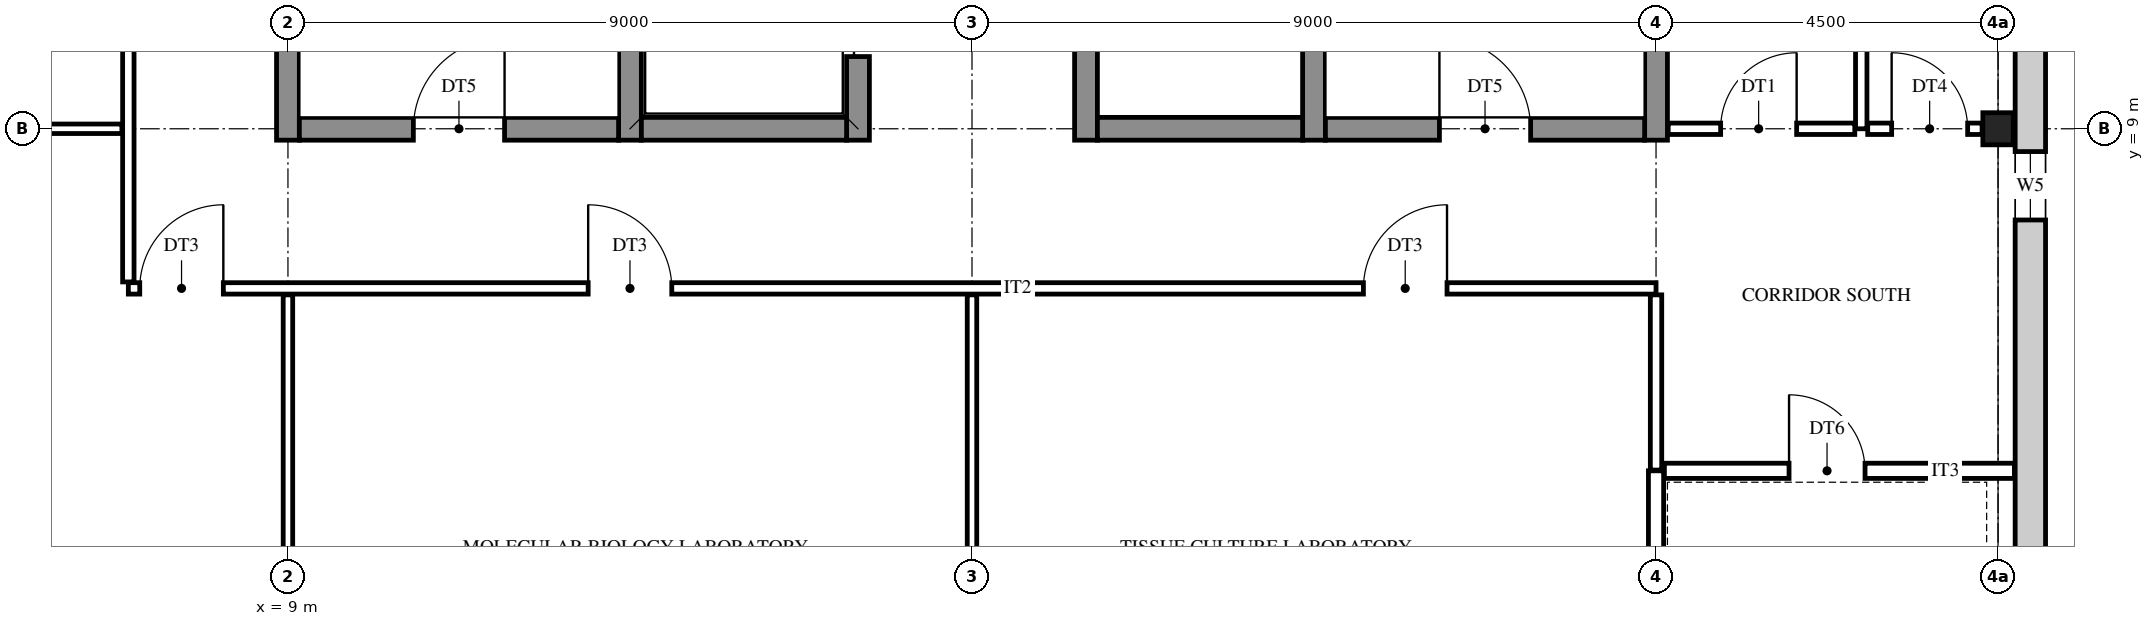
"""IFC4 building model, lengths in metres.
Left out: names, types, materials, properties, quantities, classifications, styles, units other than length and angle.
Written with IfcOpenShell. Run it as: python <this file> out.ifc"""

import sys

from ifc_helpers import new_model, si_unit, direction, frame, frame_2d, origin, origin_2d, place, context, subcontext, project, spatial, rectangle, i_section, extrude, element, fill, save


model = new_model("IFC4")
c1 = context("Model", 3, precision=1e-05, world=origin(), true_north=direction((0.0, 1.0)))
c2 = subcontext(c1, "Body", "Model", "MODEL_VIEW")
j1 = project(units=[si_unit("LENGTHUNIT", "METRE"), si_unit("PLANEANGLEUNIT", "RADIAN")], contexts=[c1])
p1 = place(None, origin())
s1 = spatial("IfcSite", under=j1, at=p1, CompositionType="ELEMENT")
p2 = place(p1, origin())
s2 = spatial("IfcBuilding", under=s1, at=p2, CompositionType="ELEMENT")
p3 = place(p2, frame((0.0, 0.0, 15.0)))
s3 = spatial("IfcBuildingStorey", under=s2, at=p3, CompositionType="ELEMENT", Elevation=15.0)
p4 = place(p3, frame((31.5, 9.0, 0.0), z_axis=(0.0, 0.0, 1.0), x_axis=(1.0, 0.0, 0.0)))
e1 = element("IfcColumn", 1, at=p4, inside=s3, PredefinedType="COLUMN", context=c2, shape_type="SweptSolid", body=[
    extrude(i_section(OverallWidth=0.4, OverallDepth=0.422, WebThickness=0.028, FlangeThickness=0.036, at=origin_2d()), origin(), (0.0, 0.0, 1.0), 4.2),
])
for number, where, z_axis, x_axis in (
    (2, (9.0, 8.85, 0.0), (0.0, 0.0, 1.0), (0.0, 1.0, 0.0)),
    (3, (13.5, 8.85, 0.0), (0.0, 0.0, 1.0), (0.0, 1.0, 0.0)),
):
    element("IfcWall", number, at=place(p3, frame(where, z_axis=z_axis, x_axis=x_axis)), inside=s3, PredefinedType="SHEAR", context=c2, shape_type="SweptSolid", body=[
        extrude(rectangle(XDim=9.3, YDim=0.3, at=frame_2d((4.65, 0.0))), origin(), (0.0, 0.0, 1.0), 4.2),
    ])
p5 = place(p3, frame((16.5, 8.85, 0.0), z_axis=(0.0, 0.0, 1.0), x_axis=(0.0, 1.0, 0.0)))
e4 = element("IfcWall", 4, at=p5, inside=s3, PredefinedType="SHEAR", context=c2, shape_type="SweptSolid", body=[
    extrude(rectangle(XDim=9.3, YDim=0.3, at=frame_2d((4.65, 0.0))), origin(), (0.0, 0.0, 1.0), 4.2),
])
p6 = place(p5, frame((1.1, 0.0, 0.0)))
e5 = element("IfcOpeningElement", 5, at=p6, cuts=e4, PredefinedType="OPENING", context=c2, shape_type="SweptSolid", body=[
    extrude(rectangle(XDim=1.1, YDim=2.1, at=frame_2d((0.55, 1.05))), frame((0.0, 0.16, 0.0), z_axis=(0.0, -1.0, 0.0), x_axis=(1.0, 0.0, 0.0)), (0.0, 0.0, 1.0), 0.32),
])
p7 = place(p5, frame((4.1, 0.0, 0.0)))
e6 = element("IfcOpeningElement", 6, at=p7, cuts=e4, PredefinedType="OPENING", context=c2, shape_type="SweptSolid", body=[
    extrude(rectangle(XDim=1.1, YDim=2.1, at=frame_2d((0.55, 1.05))), frame((0.0, 0.16, 0.0), z_axis=(0.0, -1.0, 0.0), x_axis=(1.0, 0.0, 0.0)), (0.0, 0.0, 1.0), 0.32),
])
p8 = place(p3, frame((19.5, 8.85, 0.0), z_axis=(0.0, 0.0, 1.0), x_axis=(0.0, 1.0, 0.0)))
e7 = element("IfcWall", 7, at=p8, inside=s3, PredefinedType="SHEAR", context=c2, shape_type="SweptSolid", body=[
    extrude(rectangle(XDim=9.3, YDim=0.3, at=frame_2d((4.65, 0.0))), origin(), (0.0, 0.0, 1.0), 4.2),
])
p9 = place(p8, frame((3.95, 0.0, 0.0)))
e8 = element("IfcOpeningElement", 8, at=p9, cuts=e7, PredefinedType="OPENING", context=c2, shape_type="SweptSolid", body=[
    extrude(rectangle(XDim=1.4, YDim=2.1, at=frame_2d((0.7, 1.05))), frame((0.0, 0.16, 0.0), z_axis=(0.0, -1.0, 0.0), x_axis=(1.0, 0.0, 0.0)), (0.0, 0.0, 1.0), 0.32),
])
p10 = place(p8, frame((7.1, 0.0, 0.0)))
e9 = element("IfcOpeningElement", 9, at=p10, cuts=e7, PredefinedType="OPENING", context=c2, shape_type="SweptSolid", body=[
    extrude(rectangle(XDim=1.1, YDim=2.1, at=frame_2d((0.55, 1.05))), frame((0.0, 0.16, 0.0), z_axis=(0.0, -1.0, 0.0), x_axis=(1.0, 0.0, 0.0)), (0.0, 0.0, 1.0), 0.32),
])
for number, where, z_axis, x_axis in (
    (10, (22.5, 8.85, 0.0), (0.0, 0.0, 1.0), (0.0, 1.0, 0.0)),
    (11, (27.0, 8.85, 0.0), (0.0, 0.0, 1.0), (0.0, 1.0, 0.0)),
):
    element("IfcWall", number, at=place(p3, frame(where, z_axis=z_axis, x_axis=x_axis)), inside=s3, PredefinedType="SHEAR", context=c2, shape_type="SweptSolid", body=[
        extrude(rectangle(XDim=9.3, YDim=0.3, at=frame_2d((4.65, 0.0))), origin(), (0.0, 0.0, 1.0), 4.2),
    ])
p11 = place(p3, frame((9.15, 9.0, 0.0), z_axis=(0.0, 0.0, 1.0), x_axis=(1.0, 0.0, 0.0)))
e12 = element("IfcWall", 12, at=p11, inside=s3, PredefinedType="SHEAR", context=c2, shape_type="SweptSolid", body=[
    extrude(rectangle(XDim=4.2, YDim=0.3, at=frame_2d((2.1, 0.0))), origin(), (0.0, 0.0, 1.0), 4.2),
])
p12 = place(p11, frame((1.5, 0.0, 0.0)))
e13 = element("IfcOpeningElement", 13, at=p12, cuts=e12, PredefinedType="OPENING", context=c2, shape_type="SweptSolid", body=[
    extrude(rectangle(XDim=1.2, YDim=2.1, at=frame_2d((0.6, 1.05))), frame((0.0, 0.16, 0.0), z_axis=(0.0, -1.0, 0.0), x_axis=(1.0, 0.0, 0.0)), (0.0, 0.0, 1.0), 0.32),
])
for number, where, z_axis, x_axis in (
    (14, (13.65, 9.0, 0.0), (0.0, 0.0, 1.0), (1.0, 0.0, 0.0)),
    (15, (19.65, 9.0, 0.0), (0.0, 0.0, 1.0), (1.0, 0.0, 0.0)),
):
    element("IfcWall", number, at=place(p3, frame(where, z_axis=z_axis, x_axis=x_axis)), inside=s3, PredefinedType="SHEAR", context=c2, shape_type="SweptSolid", body=[
        extrude(rectangle(XDim=2.7, YDim=0.3, at=frame_2d((1.35, 0.0))), origin(), (0.0, 0.0, 1.0), 4.2),
    ])
p13 = place(p3, frame((22.65, 9.0, 0.0), z_axis=(0.0, 0.0, 1.0), x_axis=(1.0, 0.0, 0.0)))
e16 = element("IfcWall", 16, at=p13, inside=s3, PredefinedType="SHEAR", context=c2, shape_type="SweptSolid", body=[
    extrude(rectangle(XDim=4.2, YDim=0.3, at=frame_2d((2.1, 0.0))), origin(), (0.0, 0.0, 1.0), 4.2),
])
p14 = place(p13, frame((1.5, 0.0, 0.0)))
e17 = element("IfcOpeningElement", 17, at=p14, cuts=e16, PredefinedType="OPENING", context=c2, shape_type="SweptSolid", body=[
    extrude(rectangle(XDim=1.2, YDim=2.1, at=frame_2d((0.6, 1.05))), frame((0.0, 0.16, 0.0), z_axis=(0.0, -1.0, 0.0), x_axis=(1.0, 0.0, 0.0)), (0.0, 0.0, 1.0), 0.32),
])
p15 = place(p3, frame((31.925, 27.225, 0.0), z_axis=(0.0, 0.0, 1.0), x_axis=(0.0, -1.0, 0.0)))
e18 = element("IfcWall", 18, at=p15, inside=s3, PredefinedType="STANDARD", context=c2, shape_type="SweptSolid", body=[
    extrude(rectangle(XDim=27.45, YDim=0.4, at=frame_2d((13.725, 0.0))), origin(), (0.0, 0.0, 1.0), 4.2),
])
p16 = place(p15, frame((26.025, 0.0, 0.9)))
e19 = element("IfcOpeningElement", 19, at=p16, cuts=e18, PredefinedType="OPENING", context=c2, shape_type="SweptSolid", body=[
    extrude(rectangle(XDim=0.9, YDim=2.0, at=frame_2d((0.45, 1.0))), frame((0.0, 0.21, 0.0), z_axis=(0.0, -1.0, 0.0), x_axis=(1.0, 0.0, 0.0)), (0.0, 0.0, 1.0), 0.42),
])
p17 = place(p15, frame((18.525, 0.0, 0.9)))
e20 = element("IfcOpeningElement", 20, at=p17, cuts=e18, PredefinedType="OPENING", context=c2, shape_type="SweptSolid", body=[
    extrude(rectangle(XDim=0.9, YDim=2.0, at=frame_2d((0.45, 1.0))), frame((0.0, 0.21, 0.0), z_axis=(0.0, -1.0, 0.0), x_axis=(1.0, 0.0, 0.0)), (0.0, 0.0, 1.0), 0.42),
])
p18 = place(p15, frame((15.675, 0.0, 1.6)))
e21 = element("IfcOpeningElement", 21, at=p18, cuts=e18, PredefinedType="OPENING", context=c2, shape_type="SweptSolid", body=[
    extrude(rectangle(XDim=0.6, YDim=0.9, at=frame_2d((0.3, 0.45))), frame((0.0, 0.21, 0.0), z_axis=(0.0, -1.0, 0.0), x_axis=(1.0, 0.0, 0.0)), (0.0, 0.0, 1.0), 0.42),
])
p19 = place(p15, frame((11.175, 0.0, 1.6)))
e22 = element("IfcOpeningElement", 22, at=p19, cuts=e18, PredefinedType="OPENING", context=c2, shape_type="SweptSolid", body=[
    extrude(rectangle(XDim=0.6, YDim=0.9, at=frame_2d((0.3, 0.45))), frame((0.0, 0.21, 0.0), z_axis=(0.0, -1.0, 0.0), x_axis=(1.0, 0.0, 0.0)), (0.0, 0.0, 1.0), 0.42),
])
p20 = place(p15, frame((8.025, 0.0, 0.9)))
e23 = element("IfcOpeningElement", 23, at=p20, cuts=e18, PredefinedType="OPENING", context=c2, shape_type="SweptSolid", body=[
    extrude(rectangle(XDim=0.9, YDim=2.0, at=frame_2d((0.45, 1.0))), frame((0.0, 0.21, 0.0), z_axis=(0.0, -1.0, 0.0), x_axis=(1.0, 0.0, 0.0)), (0.0, 0.0, 1.0), 0.42),
])
p21 = place(p15, frame((0.525, 0.0, 0.9)))
e24 = element("IfcOpeningElement", 24, at=p21, cuts=e18, PredefinedType="OPENING", context=c2, shape_type="SweptSolid", body=[
    extrude(rectangle(XDim=0.9, YDim=2.0, at=frame_2d((0.45, 1.0))), frame((0.0, 0.21, 0.0), z_axis=(0.0, -1.0, 0.0), x_axis=(1.0, 0.0, 0.0)), (0.0, 0.0, 1.0), 0.42),
])
p22 = place(p3, frame((6.9, 6.985, 0.0), z_axis=(0.0, 0.0, 1.0), x_axis=(0.0, 1.0, 0.0)))
e25 = element("IfcWall", 25, at=p22, inside=s3, PredefinedType="PARTITIONING", context=c2, shape_type="SweptSolid", body=[
    extrude(rectangle(XDim=13.03, YDim=0.15, at=frame_2d((6.515, 0.0))), origin(), (0.0, 0.0, 1.0), 3.537),
])
p23 = place(p22, frame((3.765, 0.0, 0.0)))
e26 = element("IfcOpeningElement", 26, at=p23, cuts=e25, PredefinedType="OPENING", context=c2, shape_type="SweptSolid", body=[
    extrude(rectangle(XDim=1.0, YDim=2.1, at=frame_2d((0.5, 1.05))), frame((0.0, 0.085, 0.0), z_axis=(0.0, -1.0, 0.0), x_axis=(1.0, 0.0, 0.0)), (0.0, 0.0, 1.0), 0.17),
])
p24 = place(p22, frame((8.265, 0.0, 0.0)))
e27 = element("IfcOpeningElement", 27, at=p24, cuts=e25, PredefinedType="OPENING", context=c2, shape_type="SweptSolid", body=[
    extrude(rectangle(XDim=1.0, YDim=2.1, at=frame_2d((0.5, 1.05))), frame((0.0, 0.085, 0.0), z_axis=(0.0, -1.0, 0.0), x_axis=(1.0, 0.0, 0.0)), (0.0, 0.0, 1.0), 0.17),
])
for number, where, z_axis, x_axis in (
    (28, (9.0, 0.221, 0.0), (0.0, 0.0, 1.0), (0.0, 1.0, 0.0)),
    (29, (18.0, 0.221, 0.0), (0.0, 0.0, 1.0), (0.0, 1.0, 0.0)),
):
    element("IfcWall", number, at=place(p3, frame(where, z_axis=z_axis, x_axis=x_axis)), inside=s3, PredefinedType="PARTITIONING", context=c2, shape_type="SweptSolid", body=[
        extrude(rectangle(XDim=6.594, YDim=0.125, at=frame_2d((3.297, 0.0))), origin(), (0.0, 0.0, 1.0), 3.537),
    ])
p25 = place(p3, frame((27.0, 0.221, 0.0), z_axis=(0.0, 0.0, 1.0), x_axis=(0.0, 1.0, 0.0)))
e30 = element("IfcWall", 30, at=p25, inside=s3, PredefinedType="PARTITIONING", context=c2, shape_type="SweptSolid", body=[
    extrude(rectangle(XDim=4.279, YDim=0.2, at=frame_2d((2.14, 0.0))), origin(), (0.0, 0.0, 1.0), 3.537),
])
p26 = place(p3, frame((27.0, 4.51, 0.0), z_axis=(0.0, 0.0, 1.0), x_axis=(0.0, 1.0, 0.0)))
e31 = element("IfcWall", 31, at=p26, inside=s3, PredefinedType="PARTITIONING", context=c2, shape_type="SweptSolid", body=[
    extrude(rectangle(XDim=2.305, YDim=0.15, at=frame_2d((1.152, 0.0))), origin(), (0.0, 0.0, 1.0), 3.537),
])
p27 = place(p3, frame((29.7, 9.0, 0.0), z_axis=(0.0, 0.0, 1.0), x_axis=(0.0, 1.0, 0.0)))
e32 = element("IfcWall", 32, at=p27, inside=s3, PredefinedType="PARTITIONING", context=c2, shape_type="SweptSolid", body=[
    extrude(rectangle(XDim=6.3, YDim=0.15, at=frame_2d((3.15, 0.0))), origin(), (0.0, 0.0, 1.0), 3.537),
])
p28 = place(p27, frame((4.0, 0.0, 0.0)))
e33 = element("IfcOpeningElement", 33, at=p28, cuts=e32, PredefinedType="OPENING", context=c2, shape_type="SweptSolid", body=[
    extrude(rectangle(XDim=1.0, YDim=2.1, at=frame_2d((0.5, 1.05))), frame((0.0, 0.085, 0.0), z_axis=(0.0, -1.0, 0.0), x_axis=(1.0, 0.0, 0.0)), (0.0, 0.0, 1.0), 0.17),
])
p29 = place(p3, frame((27.11, 4.5, 0.0), z_axis=(0.0, 0.0, 1.0), x_axis=(1.0, 0.0, 0.0)))
e34 = element("IfcWall", 34, at=p29, inside=s3, PredefinedType="PARTITIONING", context=c2, shape_type="SweptSolid", body=[
    extrude(rectangle(XDim=4.605, YDim=0.2, at=frame_2d((2.302, 0.0))), origin(), (0.0, 0.0, 1.0), 3.537),
])
p30 = place(p29, frame((1.64, 0.0, 0.0)))
e35 = element("IfcOpeningElement", 35, at=p30, cuts=e34, PredefinedType="OPENING", context=c2, shape_type="SweptSolid", body=[
    extrude(rectangle(XDim=1.0, YDim=2.1, at=frame_2d((0.5, 1.05))), frame((0.0, 0.11, 0.0), z_axis=(0.0, -1.0, 0.0), x_axis=(1.0, 0.0, 0.0)), (0.0, 0.0, 1.0), 0.22),
])
p31 = place(p3, frame((6.9, 6.9, 0.0), z_axis=(0.0, 0.0, 1.0), x_axis=(1.0, 0.0, 0.0)))
e36 = element("IfcWall", 36, at=p31, inside=s3, PredefinedType="PARTITIONING", context=c2, shape_type="SweptSolid", body=[
    extrude(rectangle(XDim=20.1, YDim=0.15, at=frame_2d((10.05, 0.0))), origin(), (0.0, 0.0, 1.0), 3.537),
])
p32 = place(p31, frame((0.15, 0.0, 0.0)))
e37 = element("IfcOpeningElement", 37, at=p32, cuts=e36, PredefinedType="OPENING", context=c2, shape_type="SweptSolid", body=[
    extrude(rectangle(XDim=1.1, YDim=2.1, at=frame_2d((0.55, 1.05))), frame((0.0, 0.085, 0.0), z_axis=(0.0, -1.0, 0.0), x_axis=(1.0, 0.0, 0.0)), (0.0, 0.0, 1.0), 0.17),
])
p33 = place(p31, frame((6.05, 0.0, 0.0)))
e38 = element("IfcOpeningElement", 38, at=p33, cuts=e36, PredefinedType="OPENING", context=c2, shape_type="SweptSolid", body=[
    extrude(rectangle(XDim=1.1, YDim=2.1, at=frame_2d((0.55, 1.05))), frame((0.0, 0.085, 0.0), z_axis=(0.0, -1.0, 0.0), x_axis=(1.0, 0.0, 0.0)), (0.0, 0.0, 1.0), 0.17),
])
p34 = place(p31, frame((16.25, 0.0, 0.0)))
e39 = element("IfcOpeningElement", 39, at=p34, cuts=e36, PredefinedType="OPENING", context=c2, shape_type="SweptSolid", body=[
    extrude(rectangle(XDim=1.1, YDim=2.1, at=frame_2d((0.55, 1.05))), frame((0.0, 0.085, 0.0), z_axis=(0.0, -1.0, 0.0), x_axis=(1.0, 0.0, 0.0)), (0.0, 0.0, 1.0), 0.17),
])
p35 = place(p3, frame((0.21, 9.0, 0.0), z_axis=(0.0, 0.0, 1.0), x_axis=(1.0, 0.0, 0.0)))
e40 = element("IfcWall", 40, at=p35, inside=s3, PredefinedType="PARTITIONING", context=c2, shape_type="SweptSolid", body=[
    extrude(rectangle(XDim=6.605, YDim=0.125, at=frame_2d((3.302, 0.0))), origin(), (0.0, 0.0, 1.0), 3.537),
])
p36 = place(p3, frame((27.16, 9.0, 0.0), z_axis=(0.0, 0.0, 1.0), x_axis=(1.0, 0.0, 0.0)))
e41 = element("IfcWall", 41, at=p36, inside=s3, PredefinedType="PARTITIONING", context=c2, shape_type="SweptSolid", body=[
    extrude(rectangle(XDim=2.455, YDim=0.15, at=frame_2d((1.228, 0.0))), origin(), (0.0, 0.0, 1.0), 3.537),
])
p37 = place(p36, frame((0.69, 0.0, 0.0)))
e42 = element("IfcOpeningElement", 42, at=p37, cuts=e41, PredefinedType="OPENING", context=c2, shape_type="SweptSolid", body=[
    extrude(rectangle(XDim=1.0, YDim=2.1, at=frame_2d((0.5, 1.05))), frame((0.0, 0.085, 0.0), z_axis=(0.0, -1.0, 0.0), x_axis=(1.0, 0.0, 0.0)), (0.0, 0.0, 1.0), 0.17),
])
p38 = place(p3, frame((29.785, 9.0, 0.0), z_axis=(0.0, 0.0, 1.0), x_axis=(1.0, 0.0, 0.0)))
e43 = element("IfcWall", 43, at=p38, inside=s3, PredefinedType="PARTITIONING", context=c2, shape_type="SweptSolid", body=[
    extrude(rectangle(XDim=1.505, YDim=0.15, at=frame_2d((0.752, 0.0))), origin(), (0.0, 0.0, 1.0), 3.537),
])
p39 = place(p38, frame((0.315, 0.0, 0.0)))
e44 = element("IfcOpeningElement", 44, at=p39, cuts=e43, PredefinedType="OPENING", context=c2, shape_type="SweptSolid", body=[
    extrude(rectangle(XDim=1.0, YDim=2.1, at=frame_2d((0.5, 1.05))), frame((0.0, 0.085, 0.0), z_axis=(0.0, -1.0, 0.0), x_axis=(1.0, 0.0, 0.0)), (0.0, 0.0, 1.0), 0.17),
])
p40 = place(p17, origin())
e45 = element("IfcWindow", 45, at=p40, inside=s3, PartitioningType="SINGLE_PANEL", PredefinedType="WINDOW", context=c2, shape_type="SweptSolid", body=[
    extrude(rectangle(XDim=0.9, YDim=2.0, at=frame_2d((0.45, 1.0))), frame((0.0, 0.03, 0.0), z_axis=(0.0, -1.0, 0.0), x_axis=(1.0, 0.0, 0.0)), (0.0, 0.0, 1.0), 0.06),
])
fill(e20, e45)
p41 = place(p12, origin())
e46 = element("IfcDoor", 46, at=p41, inside=s3, OperationType="SINGLE_SWING_RIGHT", PredefinedType="DOOR", context=c2, shape_type="SweptSolid", body=[
    extrude(rectangle(XDim=1.2, YDim=2.1, at=frame_2d((0.6, 1.05))), frame((0.0, 0.025, 0.0), z_axis=(0.0, -1.0, 0.0), x_axis=(1.0, 0.0, 0.0)), (0.0, 0.0, 1.0), 0.05),
])
fill(e13, e46)
p42 = place(p14, origin())
e47 = element("IfcDoor", 47, at=p42, inside=s3, OperationType="SINGLE_SWING_LEFT", PredefinedType="DOOR", context=c2, shape_type="SweptSolid", body=[
    extrude(rectangle(XDim=1.2, YDim=2.1, at=frame_2d((0.6, 1.05))), frame((0.0, 0.025, 0.0), z_axis=(0.0, -1.0, 0.0), x_axis=(1.0, 0.0, 0.0)), (0.0, 0.0, 1.0), 0.05),
])
fill(e17, e47)
p43 = place(p37, origin())
e48 = element("IfcDoor", 48, at=p43, inside=s3, OperationType="SINGLE_SWING_RIGHT", PredefinedType="DOOR", context=c2, shape_type="SweptSolid", body=[
    extrude(rectangle(XDim=1.0, YDim=2.1, at=frame_2d((0.5, 1.05))), frame((0.0, 0.025, 0.0), z_axis=(0.0, -1.0, 0.0), x_axis=(1.0, 0.0, 0.0)), (0.0, 0.0, 1.0), 0.05),
])
fill(e42, e48)
p44 = place(p39, origin())
e49 = element("IfcDoor", 49, at=p44, inside=s3, OperationType="SINGLE_SWING_LEFT", PredefinedType="DOOR", context=c2, shape_type="SweptSolid", body=[
    extrude(rectangle(XDim=1.0, YDim=2.1, at=frame_2d((0.5, 1.05))), frame((0.0, 0.025, 0.0), z_axis=(0.0, -1.0, 0.0), x_axis=(1.0, 0.0, 0.0)), (0.0, 0.0, 1.0), 0.05),
])
fill(e44, e49)
p45 = place(p30, frame((1.0, 0.0, 0.0), z_axis=(0.0, 0.0, 1.0), x_axis=(-1.0, 0.0, 0.0)))
e50 = element("IfcDoor", 50, at=p45, inside=s3, OperationType="SINGLE_SWING_LEFT", PredefinedType="DOOR", context=c2, shape_type="SweptSolid", body=[
    extrude(rectangle(XDim=1.0, YDim=2.1, at=frame_2d((0.5, 1.05))), frame((0.0, 0.025, 0.0), z_axis=(0.0, -1.0, 0.0), x_axis=(1.0, 0.0, 0.0)), (0.0, 0.0, 1.0), 0.05),
])
fill(e35, e50)
p46 = place(p32, frame((1.1, 0.0, 0.0), z_axis=(0.0, 0.0, 1.0), x_axis=(-1.0, 0.0, 0.0)))
e51 = element("IfcDoor", 51, at=p46, inside=s3, OperationType="SINGLE_SWING_RIGHT", PredefinedType="DOOR", context=c2, shape_type="SweptSolid", body=[
    extrude(rectangle(XDim=1.1, YDim=2.1, at=frame_2d((0.55, 1.05))), frame((0.0, 0.025, 0.0), z_axis=(0.0, -1.0, 0.0), x_axis=(1.0, 0.0, 0.0)), (0.0, 0.0, 1.0), 0.05),
])
fill(e37, e51)
p47 = place(p33, frame((1.1, 0.0, 0.0), z_axis=(0.0, 0.0, 1.0), x_axis=(-1.0, 0.0, 0.0)))
e52 = element("IfcDoor", 52, at=p47, inside=s3, OperationType="SINGLE_SWING_LEFT", PredefinedType="DOOR", context=c2, shape_type="SweptSolid", body=[
    extrude(rectangle(XDim=1.1, YDim=2.1, at=frame_2d((0.55, 1.05))), frame((0.0, 0.025, 0.0), z_axis=(0.0, -1.0, 0.0), x_axis=(1.0, 0.0, 0.0)), (0.0, 0.0, 1.0), 0.05),
])
fill(e38, e52)
p48 = place(p34, frame((1.1, 0.0, 0.0), z_axis=(0.0, 0.0, 1.0), x_axis=(-1.0, 0.0, 0.0)))
e53 = element("IfcDoor", 53, at=p48, inside=s3, OperationType="SINGLE_SWING_RIGHT", PredefinedType="DOOR", context=c2, shape_type="SweptSolid", body=[
    extrude(rectangle(XDim=1.1, YDim=2.1, at=frame_2d((0.55, 1.05))), frame((0.0, 0.025, 0.0), z_axis=(0.0, -1.0, 0.0), x_axis=(1.0, 0.0, 0.0)), (0.0, 0.0, 1.0), 0.05),
])
fill(e39, e53)
p49 = place(p6, origin())
e54 = element("IfcDoor", 54, at=p49, inside=s3, OperationType="DOUBLE_DOOR_SLIDING", PredefinedType="DOOR", context=c2, shape_type="SweptSolid", body=[
    extrude(rectangle(XDim=1.1, YDim=2.1, at=frame_2d((0.55, 1.05))), frame((0.0, 0.025, 0.0), z_axis=(0.0, -1.0, 0.0), x_axis=(1.0, 0.0, 0.0)), (0.0, 0.0, 1.0), 0.05),
])
fill(e5, e54)
save(model, sys.argv[1])
